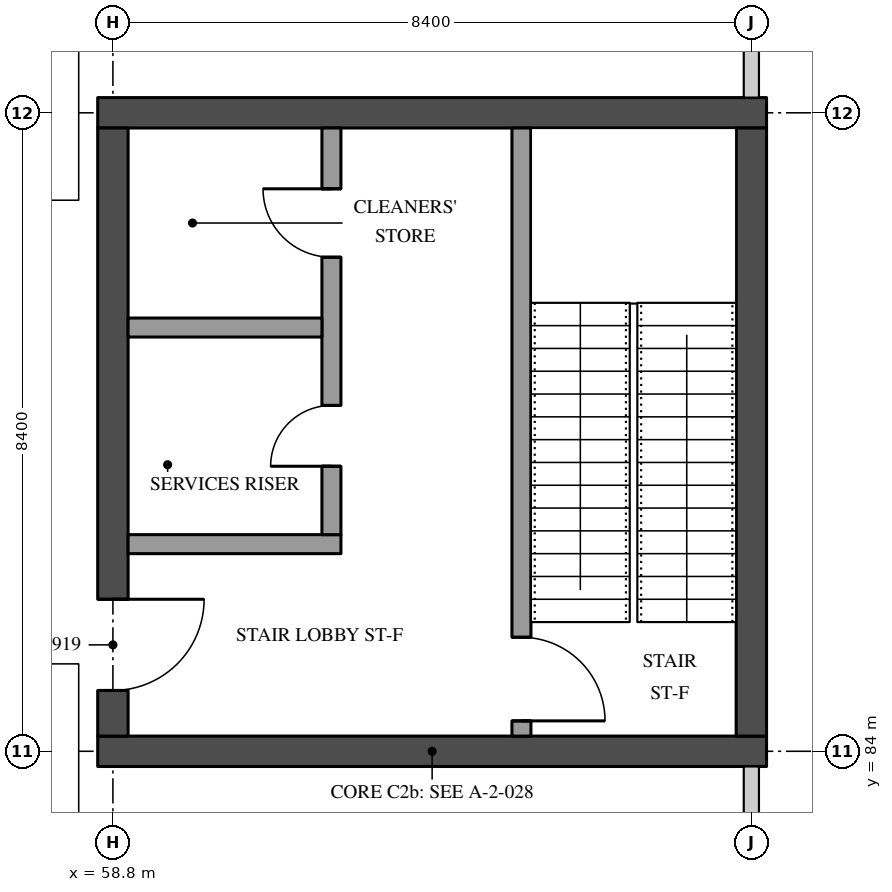
"""IFC4 building model, lengths in metres.
Left out: names, types, materials, properties, quantities, classifications, styles, units other than length and angle.
Written with IfcOpenShell. Run it as: python <this file> out.ifc"""

import sys

from ifc_helpers import new_model, si_unit, direction, frame, frame_2d, origin, place, context, subcontext, project, spatial, rectangle, extrude, element, fill, save


model = new_model("IFC4")
c1 = context("Model", 3, precision=1e-05, world=origin(), true_north=direction((0.0, 1.0)))
c2 = subcontext(c1, "Body", "Model", "MODEL_VIEW")
j1 = project(units=[si_unit("LENGTHUNIT", "METRE"), si_unit("PLANEANGLEUNIT", "RADIAN")], contexts=[c1])
p1 = place(None, origin())
s1 = spatial("IfcSite", under=j1, at=p1, CompositionType="ELEMENT")
p2 = place(p1, origin())
s2 = spatial("IfcBuilding", under=s1, at=p2, CompositionType="ELEMENT")
p3 = place(p2, frame((0.0, 0.0, -4.5)))
s3 = spatial("IfcBuildingStorey", under=s2, at=p3, CompositionType="ELEMENT", Elevation=-4.5)
for number, where, z_axis, x_axis in (
    (1, (58.6, 84.0, 0.0), (0.0, 0.0, 1.0), (1.0, 0.0, 0.0)),
    (2, (58.6, 92.4, 0.0), (0.0, 0.0, 1.0), (1.0, 0.0, 0.0)),
):
    element("IfcWall", number, at=place(p3, frame(where, z_axis=z_axis, x_axis=x_axis)), inside=s3, PredefinedType="SHEAR", context=c2, shape_type="SweptSolid", body=[
        extrude(rectangle(XDim=8.8, YDim=0.4, at=frame_2d((4.4, 0.0))), origin(), (0.0, 0.0, 1.0), 4.05),
    ])
p4 = place(p3, frame((58.8, 84.2, 0.0), z_axis=(0.0, 0.0, 1.0), x_axis=(0.0, 1.0, 0.0)))
e3 = element("IfcWall", 3, at=p4, inside=s3, PredefinedType="SHEAR", context=c2, shape_type="SweptSolid", body=[
    extrude(rectangle(XDim=8.0, YDim=0.4, at=frame_2d((4.0, 0.0))), origin(), (0.0, 0.0, 1.0), 4.05),
])
p5 = place(p4, frame((0.6, 0.0, 0.0)))
e4 = element("IfcOpeningElement", 4, at=p5, cuts=e3, PredefinedType="OPENING", context=c2, shape_type="SweptSolid", body=[
    extrude(rectangle(XDim=1.2, YDim=2.1, at=frame_2d((0.6, 1.05))), frame((0.0, 0.21, 0.0), z_axis=(0.0, -1.0, 0.0), x_axis=(1.0, 0.0, 0.0)), (0.0, 0.0, 1.0), 0.42),
])
p6 = place(p3, frame((67.2, 84.2, 0.0), z_axis=(0.0, 0.0, 1.0), x_axis=(0.0, 1.0, 0.0)))
e5 = element("IfcWall", 5, at=p6, inside=s3, PredefinedType="SHEAR", context=c2, shape_type="SweptSolid", body=[
    extrude(rectangle(XDim=8.0, YDim=0.4, at=frame_2d((4.0, 0.0))), origin(), (0.0, 0.0, 1.0), 4.05),
])
p7 = place(p3, frame((64.175, 84.2, 0.0), z_axis=(0.0, 0.0, 1.0), x_axis=(0.0, 1.0, 0.0)))
e6 = element("IfcWall", 6, at=p7, inside=s3, PredefinedType="SOLIDWALL", context=c2, shape_type="SweptSolid", body=[
    extrude(rectangle(XDim=8.0, YDim=0.25, at=frame_2d((4.0, 0.0))), origin(), (0.0, 0.0, 1.0), 4.05),
])
p8 = place(p7, frame((0.2, 0.0, 0.0)))
e7 = element("IfcOpeningElement", 7, at=p8, cuts=e6, PredefinedType="OPENING", context=c2, shape_type="SweptSolid", body=[
    extrude(rectangle(XDim=1.1, YDim=2.1, at=frame_2d((0.55, 1.05))), frame((0.0, 0.135, 0.0), z_axis=(0.0, -1.0, 0.0), x_axis=(1.0, 0.0, 0.0)), (0.0, 0.0, 1.0), 0.27),
])
p9 = place(p3, frame((61.8, 86.725, 0.0), z_axis=(0.0, 0.0, 1.0), x_axis=(-1.0, 0.0, 0.0)))
e8 = element("IfcWall", 8, at=p9, inside=s3, PredefinedType="SOLIDWALL", context=c2, shape_type="SweptSolid", body=[
    extrude(rectangle(XDim=2.8, YDim=0.25, at=frame_2d((1.4, 0.0))), origin(), (0.0, 0.0, 1.0), 4.05),
])
p10 = place(p3, frame((61.675, 86.85, 0.0), z_axis=(0.0, 0.0, 1.0), x_axis=(0.0, 1.0, 0.0)))
e9 = element("IfcWall", 9, at=p10, inside=s3, PredefinedType="SOLIDWALL", context=c2, shape_type="SweptSolid", body=[
    extrude(rectangle(XDim=5.35, YDim=0.25, at=frame_2d((2.675, 0.0))), origin(), (0.0, 0.0, 1.0), 4.05),
])
p11 = place(p10, frame((3.65, 0.0, 0.0)))
e10 = element("IfcOpeningElement", 10, at=p11, cuts=e9, PredefinedType="OPENING", context=c2, shape_type="SweptSolid", body=[
    extrude(rectangle(XDim=0.9, YDim=2.1, at=frame_2d((0.45, 1.05))), frame((0.0, 0.135, 0.0), z_axis=(0.0, -1.0, 0.0), x_axis=(1.0, 0.0, 0.0)), (0.0, 0.0, 1.0), 0.27),
])
p12 = place(p10, frame((0.9, 0.0, 0.0)))
e11 = element("IfcOpeningElement", 11, at=p12, cuts=e9, PredefinedType="OPENING", context=c2, shape_type="SweptSolid", body=[
    extrude(rectangle(XDim=0.8, YDim=2.1, at=frame_2d((0.4, 1.05))), frame((0.0, 0.135, 0.0), z_axis=(0.0, -1.0, 0.0), x_axis=(1.0, 0.0, 0.0)), (0.0, 0.0, 1.0), 0.27),
])
p13 = place(p3, frame((61.55, 89.575, 0.0), z_axis=(0.0, 0.0, 1.0), x_axis=(-1.0, 0.0, 0.0)))
e12 = element("IfcWall", 12, at=p13, inside=s3, PredefinedType="SOLIDWALL", context=c2, shape_type="SweptSolid", body=[
    extrude(rectangle(XDim=2.55, YDim=0.25, at=frame_2d((1.275, 0.0))), origin(), (0.0, 0.0, 1.0), 4.05),
])
p14 = place(p3, frame((67.2, 76.0, 0.0), z_axis=(0.0, 0.0, 1.0), x_axis=(0.0, 1.0, 0.0)))
e13 = element("IfcWall", 13, at=p14, inside=s3, PredefinedType="PARTITIONING", context=c2, shape_type="SweptSolid", body=[
    extrude(rectangle(XDim=7.8, YDim=0.2, at=frame_2d((3.9, 0.0))), origin(), (0.0, 0.0, 1.0), 4.05),
])
p15 = place(p3, frame((67.2, 92.6, 0.0), z_axis=(0.0, 0.0, 1.0), x_axis=(0.0, 1.0, 0.0)))
e14 = element("IfcWall", 14, at=p15, inside=s3, PredefinedType="PARTITIONING", context=c2, shape_type="SweptSolid", body=[
    extrude(rectangle(XDim=7.65, YDim=0.2, at=frame_2d((3.825, 0.0))), origin(), (0.0, 0.0, 1.0), 4.05),
])
p16 = place(p11, origin())
e15 = element("IfcDoor", 15, at=p16, inside=s3, OperationType="SINGLE_SWING_LEFT", PredefinedType="DOOR", context=c2, shape_type="SweptSolid", body=[
    extrude(rectangle(XDim=0.9, YDim=2.1, at=frame_2d((0.45, 1.05))), frame((0.0, 0.035, 0.0), z_axis=(0.0, -1.0, 0.0), x_axis=(1.0, 0.0, 0.0)), (0.0, 0.0, 1.0), 0.07),
])
fill(e10, e15)
p17 = place(p5, frame((1.2, 0.0, 0.0), z_axis=(0.0, 0.0, 1.0), x_axis=(-1.0, 0.0, 0.0)))
e16 = element("IfcDoor", 16, at=p17, inside=s3, OperationType="SINGLE_SWING_RIGHT", PredefinedType="DOOR", context=c2, shape_type="SweptSolid", body=[
    extrude(rectangle(XDim=1.2, YDim=2.1, at=frame_2d((0.6, 1.05))), frame((0.0, 0.035, 0.0), z_axis=(0.0, -1.0, 0.0), x_axis=(1.0, 0.0, 0.0)), (0.0, 0.0, 1.0), 0.07),
])
fill(e4, e16)
p18 = place(p12, origin())
e17 = element("IfcDoor", 17, at=p18, inside=s3, OperationType="SINGLE_SWING_RIGHT", PredefinedType="DOOR", context=c2, shape_type="SweptSolid", body=[
    extrude(rectangle(XDim=0.8, YDim=2.1, at=frame_2d((0.4, 1.05))), frame((0.0, 0.035, 0.0), z_axis=(0.0, -1.0, 0.0), x_axis=(1.0, 0.0, 0.0)), (0.0, 0.0, 1.0), 0.07),
])
fill(e11, e17)
p19 = place(p8, frame((1.1, 0.0, 0.0), z_axis=(0.0, 0.0, 1.0), x_axis=(-1.0, 0.0, 0.0)))
e18 = element("IfcDoor", 18, at=p19, inside=s3, OperationType="SINGLE_SWING_LEFT", PredefinedType="DOOR", context=c2, shape_type="SweptSolid", body=[
    extrude(rectangle(XDim=1.1, YDim=2.1, at=frame_2d((0.55, 1.05))), frame((0.0, 0.035, 0.0), z_axis=(0.0, -1.0, 0.0), x_axis=(1.0, 0.0, 0.0)), (0.0, 0.0, 1.0), 0.07),
])
fill(e7, e18)
save(model, sys.argv[1])
